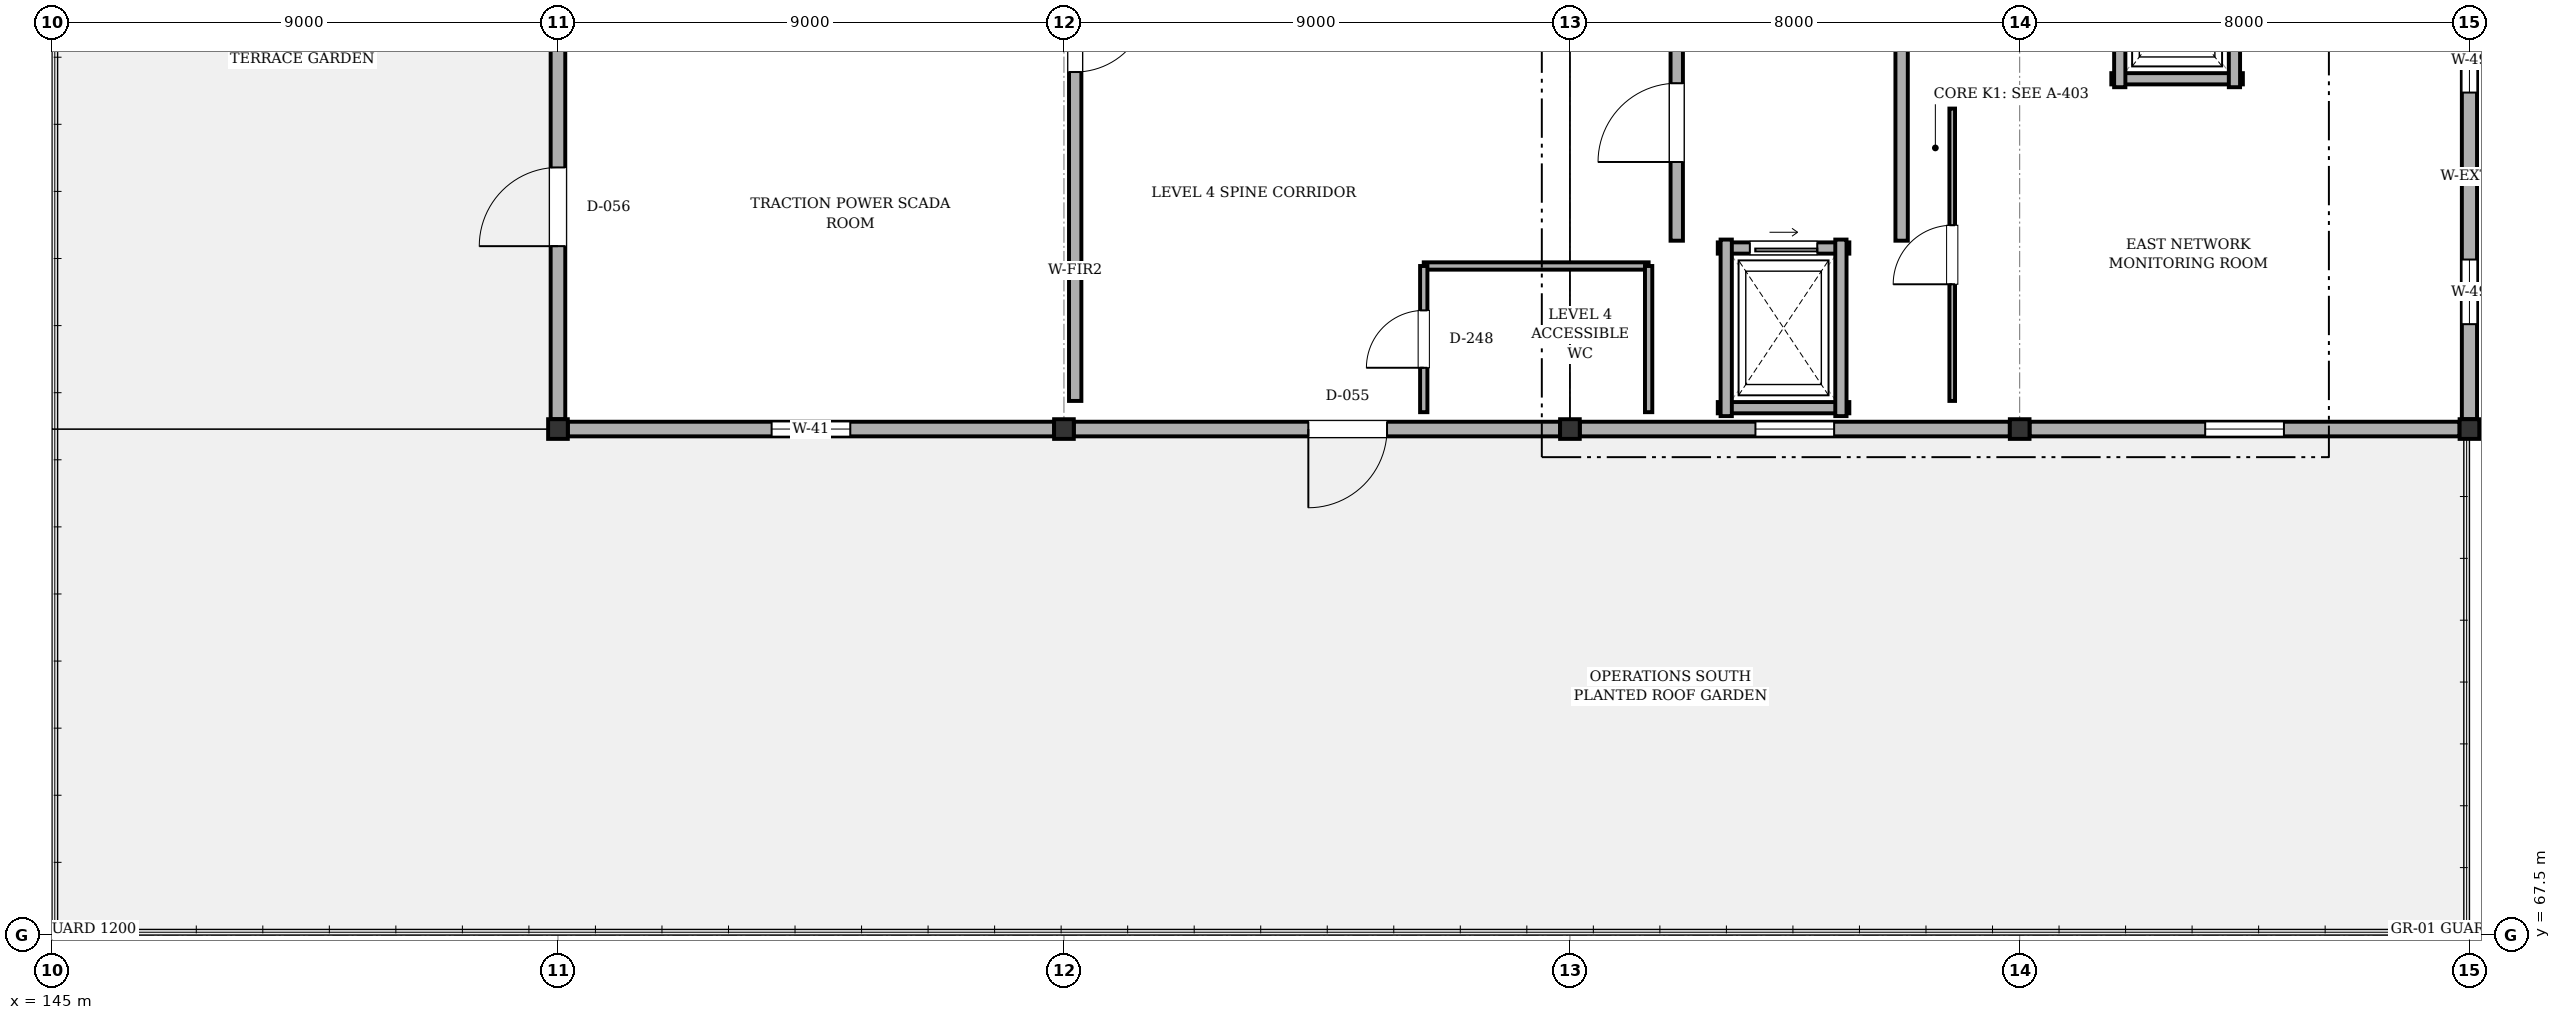
"""IFC4 building model, lengths in metres.
Left out: names, types, materials, properties, quantities, classifications, styles, units other than length and angle.
Written with IfcOpenShell. Run it as: python <this file> out.ifc"""

import sys

from ifc_helpers import new_model, si_unit, direction, frame, frame_2d, origin, origin_2d, place, context, subcontext, project, spatial, rectangle, i_section, extrude, element, fill, save


model = new_model("IFC4")
c1 = context("Model", 3, precision=1e-05, world=origin(), true_north=direction((0.0, 1.0)))
c2 = subcontext(c1, "Body", "Model", "MODEL_VIEW")
j1 = project(units=[si_unit("LENGTHUNIT", "METRE"), si_unit("PLANEANGLEUNIT", "RADIAN")], contexts=[c1])
p1 = place(None, origin())
s1 = spatial("IfcSite", under=j1, at=p1, CompositionType="ELEMENT")
p2 = place(p1, origin())
s2 = spatial("IfcBuilding", under=s1, at=p2, CompositionType="ELEMENT")
p3 = place(p2, frame((0.0, 0.0, 17.6)))
s3 = spatial("IfcBuildingStorey", under=s2, at=p3, CompositionType="ELEMENT", Elevation=17.6)
for number, where, z_axis, x_axis in (
    (1, (154.0, 76.5, 0.0), (0.0, 0.0, 1.0), (1.0, 0.0, 0.0)),
    (2, (163.0, 76.5, 0.0), (0.0, 0.0, 1.0), (1.0, 0.0, 0.0)),
    (3, (172.0, 76.5, 0.0), (0.0, 0.0, 1.0), (1.0, 0.0, 0.0)),
    (4, (180.0, 76.5, 0.0), (0.0, 0.0, 1.0), (1.0, 0.0, 0.0)),
    (5, (188.0, 76.5, 0.0), (0.0, 0.0, 1.0), (1.0, 0.0, 0.0)),
):
    element("IfcColumn", number, at=place(p3, frame(where, z_axis=z_axis, x_axis=x_axis)), inside=s3, PredefinedType="COLUMN", context=c2, shape_type="SweptSolid", body=[
        extrude(i_section(OverallWidth=0.35, OverallDepth=0.35, WebThickness=0.012, FlangeThickness=0.019, FilletRadius=0.02, at=origin_2d()), origin(), (0.0, 0.0, 1.0), 3.2),
    ])
p4 = place(p3, frame((188.0, 85.325, 0.0), z_axis=(0.0, 0.0, 1.0), x_axis=(0.0, -1.0, 0.0)))
e6 = element("IfcWall", 6, at=p4, inside=s3, PredefinedType="SOLIDWALL", context=c2, shape_type="SweptSolid", body=[
    extrude(rectangle(XDim=8.65, YDim=0.27, at=frame_2d((4.325, 0.0))), origin(), (0.0, 0.0, 1.0), 2.495),
])
p5 = place(p4, frame((1.69, 0.0, 0.9)))
e7 = element("IfcOpeningElement", 7, at=p5, cuts=e6, PredefinedType="OPENING", context=c2, shape_type="SweptSolid", body=[
    extrude(rectangle(XDim=1.15, YDim=1.45, at=frame_2d((0.575, 0.725))), frame((0.0, 0.145, 0.0), z_axis=(0.0, -1.0, 0.0), x_axis=(1.0, 0.0, 0.0)), (0.0, 0.0, 1.0), 0.29),
])
p6 = place(p4, frame((5.81, 0.0, 0.9)))
e8 = element("IfcOpeningElement", 8, at=p6, cuts=e6, PredefinedType="OPENING", context=c2, shape_type="SweptSolid", body=[
    extrude(rectangle(XDim=1.15, YDim=1.45, at=frame_2d((0.575, 0.725))), frame((0.0, 0.145, 0.0), z_axis=(0.0, -1.0, 0.0), x_axis=(1.0, 0.0, 0.0)), (0.0, 0.0, 1.0), 0.29),
])
p7 = place(p3, frame((187.825, 76.5, 0.0), z_axis=(0.0, 0.0, 1.0), x_axis=(-1.0, 0.0, 0.0)))
e9 = element("IfcWall", 9, at=p7, inside=s3, PredefinedType="SOLIDWALL", context=c2, shape_type="SweptSolid", body=[
    extrude(rectangle(XDim=7.65, YDim=0.26, at=frame_2d((3.825, 0.0))), origin(), (0.0, 0.0, 1.0), 2.495),
])
p8 = place(p7, frame((3.125, 0.0, 0.75)))
e10 = element("IfcOpeningElement", 10, at=p8, cuts=e9, PredefinedType="OPENING", context=c2, shape_type="SweptSolid", body=[
    extrude(rectangle(XDim=1.4, YDim=1.55, at=frame_2d((0.7, 0.775))), frame((0.0, 0.14, 0.0), z_axis=(0.0, -1.0, 0.0), x_axis=(1.0, 0.0, 0.0)), (0.0, 0.0, 1.0), 0.28),
])
p9 = place(p3, frame((179.825, 76.5, 0.0), z_axis=(0.0, 0.0, 1.0), x_axis=(-1.0, 0.0, 0.0)))
e11 = element("IfcWall", 11, at=p9, inside=s3, PredefinedType="SOLIDWALL", context=c2, shape_type="SweptSolid", body=[
    extrude(rectangle(XDim=7.65, YDim=0.26, at=frame_2d((3.825, 0.0))), origin(), (0.0, 0.0, 1.0), 2.515),
])
p10 = place(p9, frame((3.125, 0.0, 0.75)))
e12 = element("IfcOpeningElement", 12, at=p10, cuts=e11, PredefinedType="OPENING", context=c2, shape_type="SweptSolid", body=[
    extrude(rectangle(XDim=1.4, YDim=1.55, at=frame_2d((0.7, 0.775))), frame((0.0, 0.14, 0.0), z_axis=(0.0, -1.0, 0.0), x_axis=(1.0, 0.0, 0.0)), (0.0, 0.0, 1.0), 0.28),
])
p11 = place(p3, frame((171.825, 76.5, 0.0), z_axis=(0.0, 0.0, 1.0), x_axis=(-1.0, 0.0, 0.0)))
e13 = element("IfcWall", 13, at=p11, inside=s3, PredefinedType="SOLIDWALL", context=c2, shape_type="SweptSolid", body=[
    extrude(rectangle(XDim=8.65, YDim=0.26, at=frame_2d((4.325, 0.0))), origin(), (0.0, 0.0, 1.0), 2.505),
])
p12 = place(p11, frame((3.078, 0.0, 0.0)))
e14 = element("IfcOpeningElement", 14, at=p12, cuts=e13, PredefinedType="OPENING", context=c2, shape_type="SweptSolid", body=[
    extrude(rectangle(XDim=1.4, YDim=2.25, at=frame_2d((0.7, 1.125))), frame((0.0, 0.14, 0.0), z_axis=(0.0, -1.0, 0.0), x_axis=(1.0, 0.0, 0.0)), (0.0, 0.0, 1.0), 0.28),
])
p13 = place(p3, frame((162.825, 76.5, 0.0), z_axis=(0.0, 0.0, 1.0), x_axis=(-1.0, 0.0, 0.0)))
e15 = element("IfcWall", 15, at=p13, inside=s3, PredefinedType="SOLIDWALL", context=c2, shape_type="SweptSolid", body=[
    extrude(rectangle(XDim=8.65, YDim=0.26, at=frame_2d((4.325, 0.0))), origin(), (0.0, 0.0, 1.0), 2.505),
])
p14 = place(p13, frame((3.625, 0.0, 0.75)))
e16 = element("IfcOpeningElement", 16, at=p14, cuts=e15, PredefinedType="OPENING", context=c2, shape_type="SweptSolid", body=[
    extrude(rectangle(XDim=1.4, YDim=1.55, at=frame_2d((0.7, 0.775))), frame((0.0, 0.14, 0.0), z_axis=(0.0, -1.0, 0.0), x_axis=(1.0, 0.0, 0.0)), (0.0, 0.0, 1.0), 0.28),
])
p15 = place(p3, frame((154.0, 76.675, 0.0), z_axis=(0.0, 0.0, 1.0), x_axis=(0.0, 1.0, 0.0)))
e17 = element("IfcWall", 17, at=p15, inside=s3, PredefinedType="SOLIDWALL", context=c2, shape_type="SweptSolid", body=[
    extrude(rectangle(XDim=8.65, YDim=0.26, at=frame_2d((4.325, 0.0))), origin(), (0.0, 0.0, 1.0), 2.505),
])
p16 = place(p15, frame((3.078, 0.0, 0.0)))
e18 = element("IfcOpeningElement", 18, at=p16, cuts=e17, PredefinedType="OPENING", context=c2, shape_type="SweptSolid", body=[
    extrude(rectangle(XDim=1.4, YDim=2.25, at=frame_2d((0.7, 1.125))), frame((0.0, 0.14, 0.0), z_axis=(0.0, -1.0, 0.0), x_axis=(1.0, 0.0, 0.0)), (0.0, 0.0, 1.0), 0.28),
])
p17 = place(p3, frame((174.63, 76.88, 0.0), z_axis=(0.0, 0.0, 1.0), x_axis=(1.0, 0.0, 0.0)))
e19 = element("IfcWall", 19, at=p17, inside=s3, PredefinedType="SOLIDWALL", context=c2, shape_type="SweptSolid", body=[
    extrude(rectangle(XDim=2.34, YDim=0.2, at=frame_2d((1.17, 0.0))), origin(), (0.0, 0.0, 1.0), 2.515),
])
p18 = place(p3, frame((176.97, 79.72, 0.0), z_axis=(0.0, 0.0, 1.0), x_axis=(-1.0, 0.0, 0.0)))
e20 = element("IfcWall", 20, at=p18, inside=s3, PredefinedType="SOLIDWALL", context=c2, shape_type="SweptSolid", body=[
    extrude(rectangle(XDim=2.34, YDim=0.2, at=frame_2d((1.17, 0.0))), origin(), (0.0, 0.0, 1.0), 2.955),
])
p19 = place(p18, frame((0.57, 0.0, 0.0)))
e21 = element("IfcOpeningElement", 21, at=p19, cuts=e20, PredefinedType="OPENING", context=c2, shape_type="SweptSolid", body=[
    extrude(rectangle(XDim=1.2, YDim=2.15, at=frame_2d((0.6, 1.075))), frame((0.0, 0.11, 0.0), z_axis=(0.0, -1.0, 0.0), x_axis=(1.0, 0.0, 0.0)), (0.0, 0.0, 1.0), 0.22),
])
for number, where, z_axis, x_axis in (
    (22, (174.78, 79.87, 0.0), (0.0, 0.0, 1.0), (0.0, -1.0, 0.0)),
    (23, (176.82, 76.73, 0.0), (0.0, 0.0, 1.0), (0.0, 1.0, 0.0)),
):
    element("IfcWall", number, at=place(p3, frame(where, z_axis=z_axis, x_axis=x_axis)), inside=s3, PredefinedType="SOLIDWALL", context=c2, shape_type="SweptSolid", body=[
        extrude(rectangle(XDim=3.14, YDim=0.2, at=frame_2d((1.57, 0.0))), origin(), (0.0, 0.0, 1.0), 2.515),
    ])
p20 = place(p3, frame((181.63, 82.73, 0.0), z_axis=(0.0, 0.0, 1.0), x_axis=(1.0, 0.0, 0.0)))
e24 = element("IfcWall", 24, at=p20, inside=s3, PredefinedType="SOLIDWALL", context=c2, shape_type="SweptSolid", body=[
    extrude(rectangle(XDim=2.34, YDim=0.2, at=frame_2d((1.17, 0.0))), origin(), (0.0, 0.0, 1.0), 2.955),
])
for number, where, z_axis, x_axis in (
    (25, (181.78, 85.42, 0.0), (0.0, 0.0, 1.0), (0.0, -1.0, 0.0)),
    (26, (183.82, 82.58, 0.0), (0.0, 0.0, 1.0), (0.0, 1.0, 0.0)),
):
    element("IfcWall", number, at=place(p3, frame(where, z_axis=z_axis, x_axis=x_axis)), inside=s3, PredefinedType="SOLIDWALL", context=c2, shape_type="SweptSolid", body=[
        extrude(rectangle(XDim=2.84, YDim=0.2, at=frame_2d((1.42, 0.0))), origin(), (0.0, 0.0, 1.0), 2.515),
    ])
p21 = place(p3, frame((163.2, 90.0, 0.0), z_axis=(0.0, 0.0, 1.0), x_axis=(0.0, -1.0, 0.0)))
e27 = element("IfcWall", 27, at=p21, inside=s3, PredefinedType="SOLIDWALL", context=c2, shape_type="SweptSolid", body=[
    extrude(rectangle(XDim=13.0, YDim=0.22, at=frame_2d((6.5, 0.0))), origin(), (0.0, 0.0, 1.0), 2.505),
])
p22 = place(p21, frame((5.85, 0.0, 0.0)))
e28 = element("IfcOpeningElement", 28, at=p22, cuts=e27, PredefinedType="OPENING", context=c2, shape_type="SweptSolid", body=[
    extrude(rectangle(XDim=1.3, YDim=2.1, at=frame_2d((0.65, 1.05))), frame((0.0, 0.12, 0.0), z_axis=(0.0, -1.0, 0.0), x_axis=(1.0, 0.0, 0.0)), (0.0, 0.0, 1.0), 0.24),
])
p23 = place(p3, frame((169.4, 79.4, 0.0), z_axis=(0.0, 0.0, 1.0), x_axis=(1.0, 0.0, 0.0)))
e29 = element("IfcWall", 29, at=p23, inside=s3, PredefinedType="PARTITIONING", context=c2, shape_type="SweptSolid", body=[
    extrude(rectangle(XDim=4.0, YDim=0.13, at=frame_2d((2.0, 0.0))), origin(), (0.0, 0.0, 1.0), 2.565),
])
p24 = place(p3, frame((169.4, 76.8, 0.0), z_axis=(0.0, 0.0, 1.0), x_axis=(0.0, 1.0, 0.0)))
e30 = element("IfcWall", 30, at=p24, inside=s3, PredefinedType="PARTITIONING", context=c2, shape_type="SweptSolid", body=[
    extrude(rectangle(XDim=2.6, YDim=0.13, at=frame_2d((1.3, 0.0))), origin(), (0.0, 0.0, 1.0), 2.515),
])
p25 = place(p24, frame((0.79, 0.0, 0.0)))
e31 = element("IfcOpeningElement", 31, at=p25, cuts=e30, PredefinedType="OPENING", context=c2, shape_type="SweptSolid", body=[
    extrude(rectangle(XDim=1.02, YDim=2.05, at=frame_2d((0.51, 1.025))), frame((0.0, 0.075, 0.0), z_axis=(0.0, -1.0, 0.0), x_axis=(1.0, 0.0, 0.0)), (0.0, 0.0, 1.0), 0.15),
])
p26 = place(p3, frame((173.4, 79.4, 0.0), z_axis=(0.0, 0.0, 1.0), x_axis=(0.0, -1.0, 0.0)))
e32 = element("IfcWall", 32, at=p26, inside=s3, PredefinedType="PARTITIONING", context=c2, shape_type="SweptSolid", body=[
    extrude(rectangle(XDim=2.6, YDim=0.13, at=frame_2d((1.3, 0.0))), origin(), (0.0, 0.0, 1.0), 2.515),
])
p27 = place(p3, frame((178.8, 77.0, 0.0), z_axis=(0.0, 0.0, 1.0), x_axis=(0.0, 1.0, 0.0)))
e33 = element("IfcWall", 33, at=p27, inside=s3, PredefinedType="PARTITIONING", context=c2, shape_type="SweptSolid", body=[
    extrude(rectangle(XDim=5.2, YDim=0.1, at=frame_2d((2.6, 0.0))), origin(), (0.0, 0.0, 1.0), 2.515),
])
p28 = place(p27, frame((2.075, 0.0, 0.0)))
e34 = element("IfcOpeningElement", 34, at=p28, cuts=e33, PredefinedType="OPENING", context=c2, shape_type="SweptSolid", body=[
    extrude(rectangle(XDim=1.05, YDim=2.1, at=frame_2d((0.525, 1.05))), frame((0.0, 0.06, 0.0), z_axis=(0.0, -1.0, 0.0), x_axis=(1.0, 0.0, 0.0)), (0.0, 0.0, 1.0), 0.12),
])
p29 = place(p3, frame((173.9, 79.85, 0.0), z_axis=(0.0, 0.0, 1.0), x_axis=(0.0, 1.0, 0.0)))
e35 = element("IfcWall", 35, at=p29, inside=s3, PredefinedType="SOLIDWALL", context=c2, shape_type="SweptSolid", body=[
    extrude(rectangle(XDim=4.2, YDim=0.22, at=frame_2d((2.1, 0.0))), origin(), (0.0, 0.0, 1.0), 2.955),
])
p30 = place(p29, frame((1.4, 0.0, 0.0)))
e36 = element("IfcOpeningElement", 36, at=p30, cuts=e35, PredefinedType="OPENING", context=c2, shape_type="SweptSolid", body=[
    extrude(rectangle(XDim=1.4, YDim=2.1, at=frame_2d((0.7, 1.05))), frame((0.0, 0.12, 0.0), z_axis=(0.0, -1.0, 0.0), x_axis=(1.0, 0.0, 0.0)), (0.0, 0.0, 1.0), 0.24),
])
p31 = place(p3, frame((177.9, 84.05, 0.0), z_axis=(0.0, 0.0, 1.0), x_axis=(0.0, -1.0, 0.0)))
e37 = element("IfcWall", 37, at=p31, inside=s3, PredefinedType="SOLIDWALL", context=c2, shape_type="SweptSolid", body=[
    extrude(rectangle(XDim=4.2, YDim=0.22, at=frame_2d((2.1, 0.0))), origin(), (0.0, 0.0, 1.0), 2.955),
])
p32 = place(p5, origin())
e38 = element("IfcWindow", 38, at=p32, inside=s3, PartitioningType="SINGLE_PANEL", PredefinedType="WINDOW", context=c2, shape_type="SweptSolid", body=[
    extrude(rectangle(XDim=1.15, YDim=1.45, at=frame_2d((0.575, 0.725))), frame((0.0, 0.03, 0.0), z_axis=(0.0, -1.0, 0.0), x_axis=(1.0, 0.0, 0.0)), (0.0, 0.0, 1.0), 0.06),
])
fill(e7, e38)
p33 = place(p6, origin())
e39 = element("IfcWindow", 39, at=p33, inside=s3, PartitioningType="SINGLE_PANEL", PredefinedType="WINDOW", context=c2, shape_type="SweptSolid", body=[
    extrude(rectangle(XDim=1.15, YDim=1.45, at=frame_2d((0.575, 0.725))), frame((0.0, 0.03, 0.0), z_axis=(0.0, -1.0, 0.0), x_axis=(1.0, 0.0, 0.0)), (0.0, 0.0, 1.0), 0.06),
])
fill(e8, e39)
p34 = place(p8, origin())
e40 = element("IfcWindow", 40, at=p34, inside=s3, PartitioningType="SINGLE_PANEL", PredefinedType="WINDOW", context=c2, shape_type="SweptSolid", body=[
    extrude(rectangle(XDim=1.4, YDim=1.55, at=frame_2d((0.7, 0.775))), frame((0.0, 0.03, 0.0), z_axis=(0.0, -1.0, 0.0), x_axis=(1.0, 0.0, 0.0)), (0.0, 0.0, 1.0), 0.06),
])
fill(e10, e40)
p35 = place(p10, origin())
e41 = element("IfcWindow", 41, at=p35, inside=s3, PartitioningType="SINGLE_PANEL", PredefinedType="WINDOW", context=c2, shape_type="SweptSolid", body=[
    extrude(rectangle(XDim=1.4, YDim=1.55, at=frame_2d((0.7, 0.775))), frame((0.0, 0.03, 0.0), z_axis=(0.0, -1.0, 0.0), x_axis=(1.0, 0.0, 0.0)), (0.0, 0.0, 1.0), 0.06),
])
fill(e12, e41)
p36 = place(p12, origin())
e42 = element("IfcDoor", 42, at=p36, inside=s3, OperationType="SINGLE_SWING_RIGHT", PredefinedType="DOOR", context=c2, shape_type="SweptSolid", body=[
    extrude(rectangle(XDim=1.4, YDim=2.25, at=frame_2d((0.7, 1.125))), frame((0.0, 0.025, 0.0), z_axis=(0.0, -1.0, 0.0), x_axis=(1.0, 0.0, 0.0)), (0.0, 0.0, 1.0), 0.05),
])
fill(e14, e42)
p37 = place(p14, origin())
e43 = element("IfcWindow", 43, at=p37, inside=s3, PartitioningType="SINGLE_PANEL", PredefinedType="WINDOW", context=c2, shape_type="SweptSolid", body=[
    extrude(rectangle(XDim=1.4, YDim=1.55, at=frame_2d((0.7, 0.775))), frame((0.0, 0.03, 0.0), z_axis=(0.0, -1.0, 0.0), x_axis=(1.0, 0.0, 0.0)), (0.0, 0.0, 1.0), 0.06),
])
fill(e16, e43)
p38 = place(p16, origin())
e44 = element("IfcDoor", 44, at=p38, inside=s3, OperationType="SINGLE_SWING_LEFT", PredefinedType="DOOR", context=c2, shape_type="SweptSolid", body=[
    extrude(rectangle(XDim=1.4, YDim=2.25, at=frame_2d((0.7, 1.125))), frame((0.0, 0.025, 0.0), z_axis=(0.0, -1.0, 0.0), x_axis=(1.0, 0.0, 0.0)), (0.0, 0.0, 1.0), 0.05),
])
fill(e18, e44)
p39 = place(p19, origin())
e45 = element("IfcDoor", 45, at=p39, inside=s3, OperationType="SLIDING_TO_LEFT", PredefinedType="DOOR", context=c2, shape_type="SweptSolid", body=[
    extrude(rectangle(XDim=1.2, YDim=2.15, at=frame_2d((0.6, 1.075))), frame((0.0, 0.025, 0.0), z_axis=(0.0, -1.0, 0.0), x_axis=(1.0, 0.0, 0.0)), (0.0, 0.0, 1.0), 0.05),
])
fill(e21, e45)
p40 = place(p22, origin())
e46 = element("IfcDoor", 46, at=p40, inside=s3, OperationType="SINGLE_SWING_LEFT", PredefinedType="DOOR", context=c2, shape_type="SweptSolid", body=[
    extrude(rectangle(XDim=1.3, YDim=2.1, at=frame_2d((0.65, 1.05))), frame((0.0, 0.025, 0.0), z_axis=(0.0, -1.0, 0.0), x_axis=(1.0, 0.0, 0.0)), (0.0, 0.0, 1.0), 0.05),
])
fill(e28, e46)
p41 = place(p25, origin())
e47 = element("IfcDoor", 47, at=p41, inside=s3, OperationType="SINGLE_SWING_LEFT", PredefinedType="DOOR", context=c2, shape_type="SweptSolid", body=[
    extrude(rectangle(XDim=1.02, YDim=2.05, at=frame_2d((0.51, 1.025))), frame((0.0, 0.025, 0.0), z_axis=(0.0, -1.0, 0.0), x_axis=(1.0, 0.0, 0.0)), (0.0, 0.0, 1.0), 0.05),
])
fill(e31, e47)
p42 = place(p28, origin())
e48 = element("IfcDoor", 48, at=p42, inside=s3, OperationType="SINGLE_SWING_LEFT", PredefinedType="DOOR", context=c2, shape_type="SweptSolid", body=[
    extrude(rectangle(XDim=1.05, YDim=2.1, at=frame_2d((0.525, 1.05))), frame((0.0, 0.025, 0.0), z_axis=(0.0, -1.0, 0.0), x_axis=(1.0, 0.0, 0.0)), (0.0, 0.0, 1.0), 0.05),
])
fill(e34, e48)
p43 = place(p30, origin())
e49 = element("IfcDoor", 49, at=p43, inside=s3, OperationType="SINGLE_SWING_LEFT", PredefinedType="DOOR", context=c2, shape_type="SweptSolid", body=[
    extrude(rectangle(XDim=1.4, YDim=2.1, at=frame_2d((0.7, 1.05))), frame((0.0, 0.025, 0.0), z_axis=(0.0, -1.0, 0.0), x_axis=(1.0, 0.0, 0.0)), (0.0, 0.0, 1.0), 0.05),
])
fill(e36, e49)
save(model, sys.argv[1])
